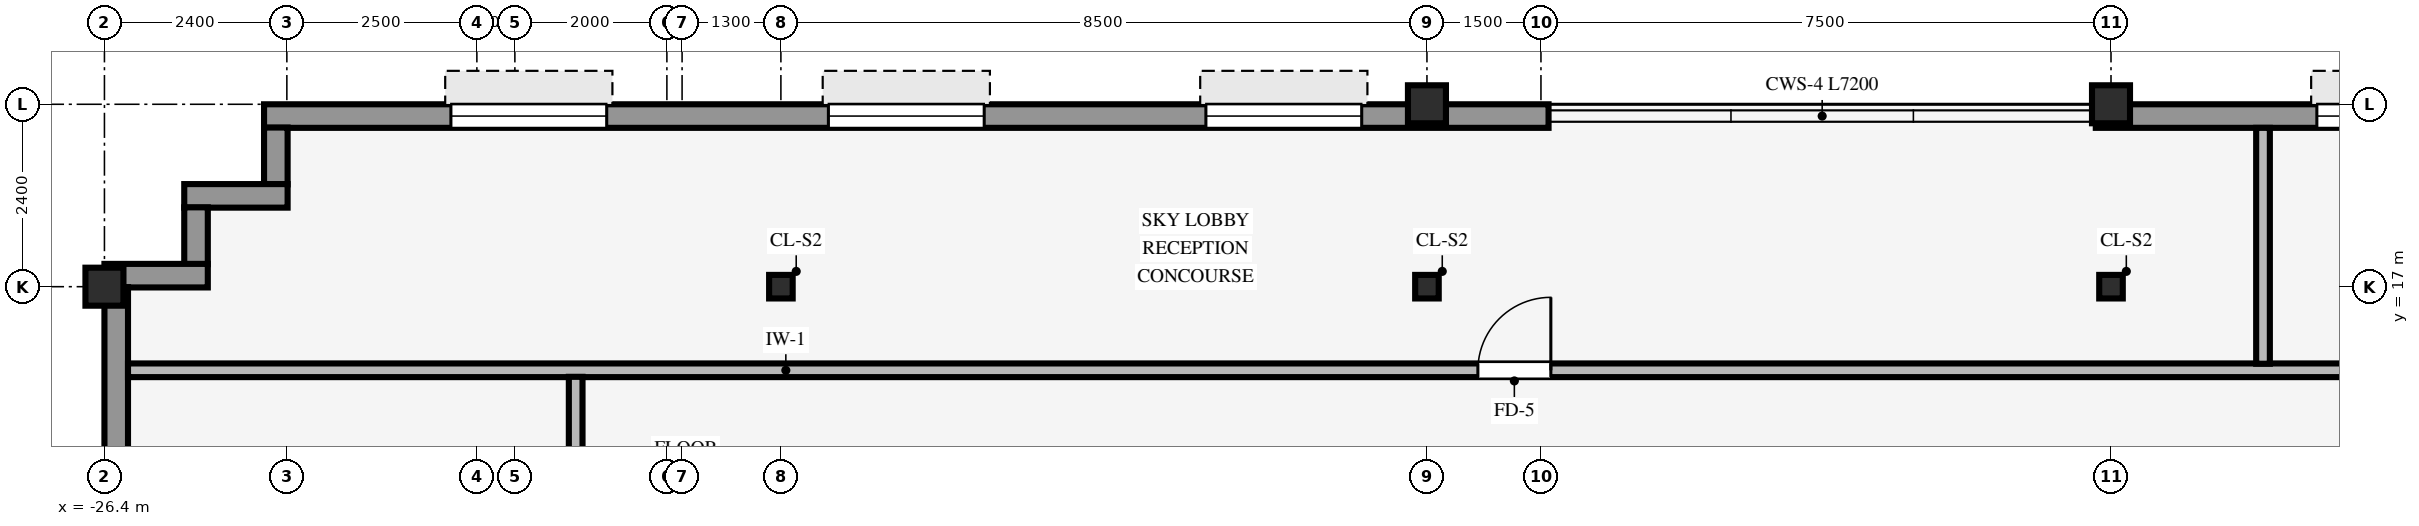
"""IFC4 building model, lengths in metres.
Left out: names, types, materials, properties, quantities, classifications, styles, units other than length and angle.
Written with IfcOpenShell. Run it as: python <this file> out.ifc"""

import sys

from ifc_helpers import new_model, si_unit, direction, frame, frame_2d, origin, origin_2d, place, context, subcontext, project, spatial, rectangle, hollow_rectangle, i_section, extrude, source, transform, mapped, element, fill, save


model = new_model("IFC4")
c1 = context("Model", 3, precision=1e-05, world=origin(), true_north=direction((0.0, 1.0)))
c2 = subcontext(c1, "Body", "Model", "MODEL_VIEW")
j1 = project(units=[si_unit("LENGTHUNIT", "METRE"), si_unit("PLANEANGLEUNIT", "RADIAN")], contexts=[c1])
p1 = place(None, origin())
s1 = spatial("IfcSite", under=j1, at=p1, CompositionType="ELEMENT")
p2 = place(p1, origin())
s2 = spatial("IfcBuilding", under=s1, at=p2, CompositionType="ELEMENT")
p3 = place(p2, frame((0.0, 0.0, 223.75)))
s3 = spatial("IfcBuildingStorey", under=s2, at=p3, CompositionType="ELEMENT", Elevation=223.75)
for number, where, z_axis, x_axis in (
    (1, (-26.4, 17.0, 0.0), (0.0, 0.0, 1.0), (1.0, 0.0, 0.0)),
    (2, (-9.0, 19.4, 0.0), (0.0, 0.0, 1.0), (1.0, 0.0, 0.0)),
    (3, (0.0, 19.4, 0.0), (0.0, 0.0, 1.0), (1.0, 0.0, 0.0)),
):
    element("IfcColumn", number, at=place(p3, frame(where, z_axis=z_axis, x_axis=x_axis)), inside=s3, PredefinedType="COLUMN", context=c2, shape_type="SweptSolid", body=[
        extrude(hollow_rectangle(XDim=0.5, YDim=0.5, WallThickness=0.032, InnerFilletRadius=0.032, OuterFilletRadius=0.064, at=origin_2d()), origin(), (0.0, 0.0, 1.0), 3.37),
    ])
for number, where, z_axis, x_axis in (
    (4, (0.0, 17.0, 0.0), (0.0, 0.0, 1.0), (1.0, 0.0, 0.0)),
    (5, (-17.5, 17.0, 0.0), (0.0, 0.0, 1.0), (1.0, 0.0, 0.0)),
    (6, (-9.0, 17.0, 0.0), (0.0, 0.0, 1.0), (1.0, 0.0, 0.0)),
):
    element("IfcColumn", number, at=place(p3, frame(where, z_axis=z_axis, x_axis=x_axis)), inside=s3, PredefinedType="COLUMN", context=c2, shape_type="SweptSolid", body=[
        extrude(i_section(OverallWidth=0.31, OverallDepth=0.31, WebThickness=0.015, FlangeThickness=0.015, FilletRadius=0.015, at=origin_2d()), origin(), (0.0, 0.0, 1.0), 3.37),
    ])
p4 = place(p3, frame((-24.3, 19.245, 0.0), z_axis=(0.0, 0.0, 1.0), x_axis=(1.0, 0.0, 0.0)))
e7 = element("IfcWall", 7, at=p4, inside=s3, PredefinedType="STANDARD", context=c2, shape_type="SweptSolid", body=[
    extrude(rectangle(XDim=16.9, YDim=0.31, at=frame_2d((8.45, 0.0))), origin(), (0.0, 0.0, 1.0), 2.705),
])
p5 = place(p4, frame((2.458, 0.0, 0.8)))
e8 = element("IfcOpeningElement", 8, at=p5, cuts=e7, PredefinedType="OPENING", context=c2, shape_type="SweptSolid", body=[
    extrude(rectangle(XDim=2.05, YDim=1.52, at=frame_2d((1.025, 0.76))), frame((0.0, 0.165, 0.0), z_axis=(0.0, -1.0, 0.0), x_axis=(1.0, 0.0, 0.0)), (0.0, 0.0, 1.0), 0.33),
])
p6 = place(p4, frame((7.425, 0.0, 0.8)))
e9 = element("IfcOpeningElement", 9, at=p6, cuts=e7, PredefinedType="OPENING", context=c2, shape_type="SweptSolid", body=[
    extrude(rectangle(XDim=2.05, YDim=1.52, at=frame_2d((1.025, 0.76))), frame((0.0, 0.165, 0.0), z_axis=(0.0, -1.0, 0.0), x_axis=(1.0, 0.0, 0.0)), (0.0, 0.0, 1.0), 0.33),
])
p7 = place(p4, frame((12.392, 0.0, 0.8)))
e10 = element("IfcOpeningElement", 10, at=p7, cuts=e7, PredefinedType="OPENING", context=c2, shape_type="SweptSolid", body=[
    extrude(rectangle(XDim=2.05, YDim=1.52, at=frame_2d((1.025, 0.76))), frame((0.0, 0.165, 0.0), z_axis=(0.0, -1.0, 0.0), x_axis=(1.0, 0.0, 0.0)), (0.0, 0.0, 1.0), 0.33),
])
p8 = place(p3, frame((-0.2, 19.245, 0.0), z_axis=(0.0, 0.0, 1.0), x_axis=(1.0, 0.0, 0.0)))
e11 = element("IfcWall", 11, at=p8, inside=s3, PredefinedType="STANDARD", context=c2, shape_type="SweptSolid", body=[
    extrude(rectangle(XDim=16.9, YDim=0.31, at=frame_2d((8.45, 0.0))), origin(), (0.0, 0.0, 1.0), 2.705),
])
p9 = place(p8, frame((2.908, 0.0, 0.8)))
e12 = element("IfcOpeningElement", 12, at=p9, cuts=e11, PredefinedType="OPENING", context=c2, shape_type="SweptSolid", body=[
    extrude(rectangle(XDim=2.05, YDim=1.52, at=frame_2d((1.025, 0.76))), frame((0.0, 0.165, 0.0), z_axis=(0.0, -1.0, 0.0), x_axis=(1.0, 0.0, 0.0)), (0.0, 0.0, 1.0), 0.33),
])
p10 = place(p8, frame((6.075, 0.0, 0.8)))
e13 = element("IfcOpeningElement", 13, at=p10, cuts=e11, PredefinedType="OPENING", context=c2, shape_type="SweptSolid", body=[
    extrude(rectangle(XDim=2.05, YDim=1.52, at=frame_2d((1.025, 0.76))), frame((0.0, 0.165, 0.0), z_axis=(0.0, -1.0, 0.0), x_axis=(1.0, 0.0, 0.0)), (0.0, 0.0, 1.0), 0.33),
])
p11 = place(p8, frame((12.392, 0.0, 0.8)))
e14 = element("IfcOpeningElement", 14, at=p11, cuts=e11, PredefinedType="OPENING", context=c2, shape_type="SweptSolid", body=[
    extrude(rectangle(XDim=2.05, YDim=1.52, at=frame_2d((1.025, 0.76))), frame((0.0, 0.165, 0.0), z_axis=(0.0, -1.0, 0.0), x_axis=(1.0, 0.0, 0.0)), (0.0, 0.0, 1.0), 0.33),
])
p12 = place(p3, frame((-24.145, 18.346, 0.0), z_axis=(0.0, 0.0, 1.0), x_axis=(0.0, 1.0, 0.0)))
e15 = element("IfcWall", 15, at=p12, inside=s3, PredefinedType="STANDARD", context=c2, shape_type="SweptSolid", body=[
    extrude(rectangle(XDim=0.748, YDim=0.31, at=frame_2d((0.374, 0.0))), origin(), (0.0, 0.0, 1.0), 2.892),
])
p13 = place(p3, frame((-25.35, 18.195, 0.0), z_axis=(0.0, 0.0, 1.0), x_axis=(1.0, 0.0, 0.0)))
e16 = element("IfcWall", 16, at=p13, inside=s3, PredefinedType="STANDARD", context=c2, shape_type="SweptSolid", body=[
    extrude(rectangle(XDim=1.36, YDim=0.31, at=frame_2d((0.68, 0.0))), origin(), (0.0, 0.0, 1.0), 2.892),
])
p14 = place(p3, frame((-25.195, 17.296, 0.0), z_axis=(0.0, 0.0, 1.0), x_axis=(0.0, 1.0, 0.0)))
e17 = element("IfcWall", 17, at=p14, inside=s3, PredefinedType="STANDARD", context=c2, shape_type="SweptSolid", body=[
    extrude(rectangle(XDim=0.748, YDim=0.31, at=frame_2d((0.374, 0.0))), origin(), (0.0, 0.0, 1.0), 2.892),
])
p15 = place(p3, frame((-26.4, 17.145, 0.0), z_axis=(0.0, 0.0, 1.0), x_axis=(1.0, 0.0, 0.0)))
e18 = element("IfcWall", 18, at=p15, inside=s3, PredefinedType="STANDARD", context=c2, shape_type="SweptSolid", body=[
    extrude(rectangle(XDim=1.36, YDim=0.31, at=frame_2d((0.68, 0.0))), origin(), (0.0, 0.0, 1.0), 2.892),
])
p16 = place(p3, frame((-26.245, -16.994, 0.0), z_axis=(0.0, 0.0, 1.0), x_axis=(0.0, 1.0, 0.0)))
e19 = element("IfcWall", 19, at=p16, inside=s3, PredefinedType="STANDARD", context=c2, shape_type="SweptSolid", body=[
    extrude(rectangle(XDim=33.988, YDim=0.31, at=frame_2d((16.994, 0.0))), origin(), (0.0, 0.0, 1.0), 2.705),
])
p17 = place(p16, frame((21.194, 0.0, 0.0)))
e20 = element("IfcOpeningElement", 20, at=p17, cuts=e19, PredefinedType="OPENING", context=c2, shape_type="SweptSolid", body=[
    extrude(rectangle(XDim=1.05, YDim=2.1, at=frame_2d((0.525, 1.05))), frame((0.0, 0.165, 0.0), z_axis=(0.0, -1.0, 0.0), x_axis=(1.0, 0.0, 0.0)), (0.0, 0.0, 1.0), 0.33),
])
p18 = place(p16, frame((2.66, 0.0, 0.8)))
e21 = element("IfcOpeningElement", 21, at=p18, cuts=e19, PredefinedType="OPENING", context=c2, shape_type="SweptSolid", body=[
    extrude(rectangle(XDim=1.25, YDim=1.52, at=frame_2d((0.625, 0.76))), frame((0.0, 0.165, 0.0), z_axis=(0.0, -1.0, 0.0), x_axis=(1.0, 0.0, 0.0)), (0.0, 0.0, 1.0), 0.33),
])
p19 = place(p16, frame((8.13, 0.0, 0.8)))
e22 = element("IfcOpeningElement", 22, at=p19, cuts=e19, PredefinedType="OPENING", context=c2, shape_type="SweptSolid", body=[
    extrude(rectangle(XDim=1.25, YDim=1.52, at=frame_2d((0.625, 0.76))), frame((0.0, 0.165, 0.0), z_axis=(0.0, -1.0, 0.0), x_axis=(1.0, 0.0, 0.0)), (0.0, 0.0, 1.0), 0.33),
])
p20 = place(p16, frame((11.799, 0.0, 0.8)))
e23 = element("IfcOpeningElement", 23, at=p20, cuts=e19, PredefinedType="OPENING", context=c2, shape_type="SweptSolid", body=[
    extrude(rectangle(XDim=1.25, YDim=1.52, at=frame_2d((0.625, 0.76))), frame((0.0, 0.165, 0.0), z_axis=(0.0, -1.0, 0.0), x_axis=(1.0, 0.0, 0.0)), (0.0, 0.0, 1.0), 0.33),
])
p21 = place(p16, frame((17.719, 0.0, 0.8)))
e24 = element("IfcOpeningElement", 24, at=p21, cuts=e19, PredefinedType="OPENING", context=c2, shape_type="SweptSolid", body=[
    extrude(rectangle(XDim=1.25, YDim=1.52, at=frame_2d((0.625, 0.76))), frame((0.0, 0.165, 0.0), z_axis=(0.0, -1.0, 0.0), x_axis=(1.0, 0.0, 0.0)), (0.0, 0.0, 1.0), 0.33),
])
p22 = place(p16, frame((19.589, 0.0, 0.8)))
e25 = element("IfcOpeningElement", 25, at=p22, cuts=e19, PredefinedType="OPENING", context=c2, shape_type="SweptSolid", body=[
    extrude(rectangle(XDim=1.25, YDim=1.52, at=frame_2d((0.625, 0.76))), frame((0.0, 0.165, 0.0), z_axis=(0.0, -1.0, 0.0), x_axis=(1.0, 0.0, 0.0)), (0.0, 0.0, 1.0), 0.33),
])
p23 = place(p16, frame((24.608, 0.0, 0.8)))
e26 = element("IfcOpeningElement", 26, at=p23, cuts=e19, PredefinedType="OPENING", context=c2, shape_type="SweptSolid", body=[
    extrude(rectangle(XDim=1.25, YDim=1.52, at=frame_2d((0.625, 0.76))), frame((0.0, 0.165, 0.0), z_axis=(0.0, -1.0, 0.0), x_axis=(1.0, 0.0, 0.0)), (0.0, 0.0, 1.0), 0.33),
])
p24 = place(p16, frame((30.078, 0.0, 0.8)))
e27 = element("IfcOpeningElement", 27, at=p24, cuts=e19, PredefinedType="OPENING", context=c2, shape_type="SweptSolid", body=[
    extrude(rectangle(XDim=1.25, YDim=1.52, at=frame_2d((0.625, 0.76))), frame((0.0, 0.165, 0.0), z_axis=(0.0, -1.0, 0.0), x_axis=(1.0, 0.0, 0.0)), (0.0, 0.0, 1.0), 0.33),
])
p25 = place(p3, frame((-26.09, 15.9, 0.0), z_axis=(0.0, 0.0, 1.0), x_axis=(1.0, 0.0, 0.0)))
e28 = element("IfcWall", 28, at=p25, inside=s3, PredefinedType="PARTITIONING", context=c2, shape_type="SweptSolid", body=[
    extrude(rectangle(XDim=35.09, YDim=0.18, at=frame_2d((17.545, 0.0))), origin(), (0.0, 0.0, 1.0), 3.36),
])
p26 = place(p25, frame((17.76, 0.0, 0.0)))
e29 = element("IfcOpeningElement", 29, at=p26, cuts=e28, PredefinedType="OPENING", context=c2, shape_type="SweptSolid", body=[
    extrude(rectangle(XDim=0.96, YDim=2.1, at=frame_2d((0.48, 1.05))), frame((0.0, 0.1, 0.0), z_axis=(0.0, -1.0, 0.0), x_axis=(1.0, 0.0, 0.0)), (0.0, 0.0, 1.0), 0.2),
])
p27 = place(p25, frame((29.91, 0.0, 0.0)))
e30 = element("IfcOpeningElement", 30, at=p27, cuts=e28, PredefinedType="OPENING", context=c2, shape_type="SweptSolid", body=[
    extrude(rectangle(XDim=0.96, YDim=2.1, at=frame_2d((0.48, 1.05))), frame((0.0, 0.1, 0.0), z_axis=(0.0, -1.0, 0.0), x_axis=(1.0, 0.0, 0.0)), (0.0, 0.0, 1.0), 0.2),
])
p28 = place(p3, frame((-20.2, -15.814, 0.0), z_axis=(0.0, 0.0, 1.0), x_axis=(0.0, 1.0, 0.0)))
e31 = element("IfcWall", 31, at=p28, inside=s3, PredefinedType="PARTITIONING", context=c2, shape_type="SweptSolid", body=[
    extrude(rectangle(XDim=31.628, YDim=0.18, at=frame_2d((15.814, 0.0))), origin(), (0.0, 0.0, 1.0), 3.36),
])
p29 = place(p28, frame((15.334, 0.0, 0.0)))
e32 = element("IfcOpeningElement", 32, at=p29, cuts=e31, PredefinedType="OPENING", context=c2, shape_type="SweptSolid", body=[
    extrude(rectangle(XDim=0.96, YDim=2.1, at=frame_2d((0.48, 1.05))), frame((0.0, 0.1, 0.0), z_axis=(0.0, -1.0, 0.0), x_axis=(1.0, 0.0, 0.0)), (0.0, 0.0, 1.0), 0.2),
])
p30 = place(p3, frame((2.0, 15.986, 0.0), z_axis=(0.0, 0.0, 1.0), x_axis=(0.0, 1.0, 0.0)))
e33 = element("IfcWall", 33, at=p30, inside=s3, PredefinedType="PARTITIONING", context=c2, shape_type="SweptSolid", body=[
    extrude(rectangle(XDim=3.104, YDim=0.18, at=frame_2d((1.552, 0.0))), origin(), (0.0, 0.0, 1.0), 3.36),
])
m1 = source(origin(), c2, "Body", "SweptSolid", [
    extrude(rectangle(XDim=2.05, YDim=1.52, at=frame_2d((1.025, 0.76))), frame((0.0, 0.03, 0.0), z_axis=(0.0, -1.0, 0.0), x_axis=(1.0, 0.0, 0.0)), (0.0, 0.0, 1.0), 0.06),
])
p31 = place(p5, origin())
e34 = element("IfcWindow", 34, at=p31, inside=s3, PartitioningType="SINGLE_PANEL", PredefinedType="WINDOW", context=c2, shape_type="MappedRepresentation", body=[
    mapped(m1, transform((0.0, 0.0, 0.0), scale=1.0)),
])
fill(e8, e34)
p32 = place(p6, origin())
e35 = element("IfcWindow", 35, at=p32, inside=s3, PartitioningType="SINGLE_PANEL", PredefinedType="WINDOW", context=c2, shape_type="MappedRepresentation", body=[
    mapped(m1, transform((0.0, 0.0, 0.0), scale=1.0)),
])
fill(e9, e35)
p33 = place(p7, origin())
e36 = element("IfcWindow", 36, at=p33, inside=s3, PartitioningType="SINGLE_PANEL", PredefinedType="WINDOW", context=c2, shape_type="MappedRepresentation", body=[
    mapped(m1, transform((0.0, 0.0, 0.0), scale=1.0)),
])
fill(e10, e36)
p34 = place(p9, origin())
e37 = element("IfcWindow", 37, at=p34, inside=s3, PartitioningType="SINGLE_PANEL", PredefinedType="WINDOW", context=c2, shape_type="MappedRepresentation", body=[
    mapped(m1, transform((0.0, 0.0, 0.0), scale=1.0)),
])
fill(e12, e37)
m2 = source(origin(), c2, "Body", "SweptSolid", [
    extrude(rectangle(XDim=0.96, YDim=2.1, at=frame_2d((0.48, 1.05))), frame((0.0, 0.025, 0.0), z_axis=(0.0, -1.0, 0.0), x_axis=(1.0, 0.0, 0.0)), (0.0, 0.0, 1.0), 0.05),
])
p35 = place(p26, origin())
e38 = element("IfcDoor", 38, at=p35, inside=s3, OperationType="SINGLE_SWING_RIGHT", PredefinedType="DOOR", context=c2, shape_type="MappedRepresentation", body=[
    mapped(m2, transform((0.0, 0.0, 0.0), scale=1.0)),
])
fill(e29, e38)
save(model, sys.argv[1])
